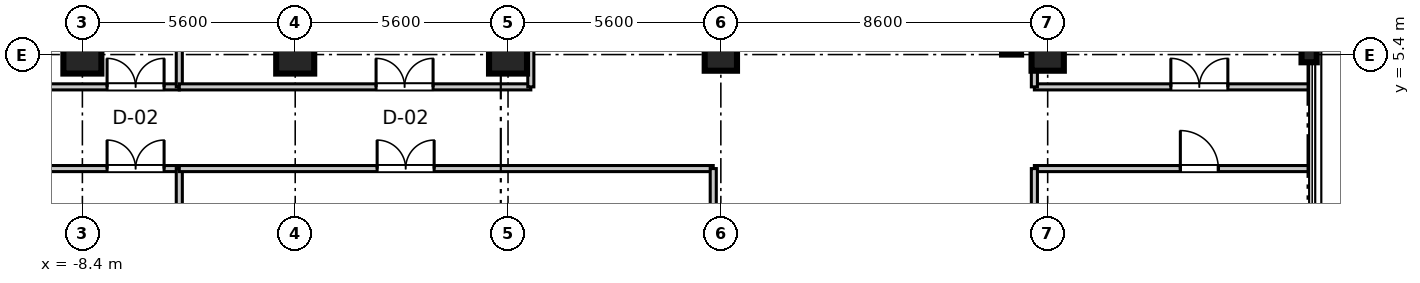
"""IFC4 building model, lengths in metres.
Left out: names, types, materials, properties, quantities, classifications, styles, units other than length and angle.
Written with IfcOpenShell. Run it as: python <this file> out.ifc"""

import sys

from ifc_helpers import new_model, si_unit, direction, frame, frame_2d, origin, origin_2d, place, context, subcontext, project, spatial, rectangle, i_section, extrude, source, transform, mapped, element, fill, save


model = new_model("IFC4")
c1 = context("Model", 3, precision=1e-05, world=origin(), true_north=direction((0.0, 1.0)))
c2 = subcontext(c1, "Body", "Model", "MODEL_VIEW")
j1 = project(units=[si_unit("LENGTHUNIT", "METRE"), si_unit("PLANEANGLEUNIT", "RADIAN")], contexts=[c1])
p1 = place(None, origin())
s1 = spatial("IfcSite", under=j1, at=p1, CompositionType="ELEMENT")
p2 = place(p1, origin())
s2 = spatial("IfcBuilding", under=s1, at=p2, CompositionType="ELEMENT")
p3 = place(p2, frame((0.0, 0.0, 256.7)))
s3 = spatial("IfcBuildingStorey", under=s2, at=p3, CompositionType="ELEMENT", Elevation=256.7)
m1 = source(origin(), c2, "Body", "SweptSolid", [
    extrude(rectangle(XDim=1.0, YDim=1.0, at=origin_2d()), origin(), (0.0, 0.0, 1.0), 4.755),
])
for number, where, z_axis, x_axis in (
    (1, (-8.4, 5.4, 0.0), (0.0, 0.0, 1.0), (1.0, 0.0, 0.0)),
    (2, (-2.8, 5.4, 0.0), (0.0, 0.0, 1.0), (1.0, 0.0, 0.0)),
    (3, (2.8, 5.4, 0.0), (0.0, 0.0, 1.0), (1.0, 0.0, 0.0)),
):
    element("IfcColumn", number, at=place(p3, frame(where, z_axis=z_axis, x_axis=x_axis)), inside=s3, PredefinedType="COLUMN", context=c2, shape_type="MappedRepresentation", body=[
        mapped(m1, transform((0.0, 0.0, 0.0), scale=1.0)),
    ])
m2 = source(origin(), c2, "Body", "SweptSolid", [
    extrude(rectangle(XDim=0.85, YDim=0.85, at=origin_2d()), origin(), (0.0, 0.0, 1.0), 4.755),
])
for number, where, z_axis, x_axis in (
    (4, (8.4, 5.4, 0.0), (0.0, 0.0, 1.0), (1.0, 0.0, 0.0)),
    (5, (17.0, 5.4, 0.0), (0.0, 0.0, 1.0), (1.0, 0.0, 0.0)),
):
    element("IfcColumn", number, at=place(p3, frame(where, z_axis=z_axis, x_axis=x_axis)), inside=s3, PredefinedType="PILASTER", context=c2, shape_type="MappedRepresentation", body=[
        mapped(m2, transform((0.0, 0.0, 0.0), scale=1.0)),
    ])
m3 = source(origin(), c2, "Body", "SweptSolid", [
    extrude(i_section(OverallWidth=0.401, OverallDepth=0.406, WebThickness=0.016, FlangeThickness=0.025, at=origin_2d()), origin(), (0.0, 0.0, 1.0), 4.707),
])
p4 = place(p3, frame((23.88, 5.4, 0.0), z_axis=(-0.148692963872, 0.0, 0.988883411983), x_axis=(0.0, -1.0, 0.0)))
e6 = element("IfcColumn", 6, at=p4, inside=s3, PredefinedType="COLUMN", context=c2, shape_type="MappedRepresentation", body=[
    mapped(m3, transform((0.0, 0.0, 0.0), scale=1.0)),
])
m4 = source(origin(), c2, "Body", "SweptSolid", [
    extrude(rectangle(XDim=11.6, YDim=0.5, at=frame_2d((5.8, 0.0))), origin(), (0.0, 0.0, 1.0), 4.44),
])
p5 = place(p3, frame((16.05, 5.4, 0.0), z_axis=(0.0, 0.0, 1.0), x_axis=(0.0, 1.0, 0.0)))
e7 = element("IfcWall", 7, at=p5, inside=s3, PredefinedType="SHEAR", context=c2, shape_type="MappedRepresentation", body=[
    mapped(m4, transform((0.0, 0.0, 0.0), scale=1.0)),
])
m5 = source(origin(), c2, "Body", "SweptSolid", [
    extrude(rectangle(XDim=18.05, YDim=0.16, at=frame_2d((9.025, 0.0))), origin(), (0.0, 0.0, 1.0), 3.4),
])
p6 = place(p3, frame((-23.9, 2.4, 0.0), z_axis=(0.0, 0.0, 1.0), x_axis=(1.0, 0.0, 0.0)))
e8 = element("IfcWall", 8, at=p6, inside=s3, PredefinedType="PARTITIONING", context=c2, shape_type="MappedRepresentation", body=[
    mapped(m5, transform((0.0, 0.0, 0.0), scale=1.0)),
])
p7 = place(p6, frame((16.15, 0.0, 0.0)))
e9 = element("IfcOpeningElement", 9, at=p7, cuts=e8, PredefinedType="OPENING", context=c2, shape_type="SweptSolid", body=[
    extrude(rectangle(XDim=1.5, YDim=2.15, at=frame_2d((0.75, 1.075))), frame((0.0, 0.09, 0.0), z_axis=(0.0, -1.0, 0.0), x_axis=(1.0, 0.0, 0.0)), (0.0, 0.0, 1.0), 0.18),
])
m6 = source(origin(), c2, "Body", "SweptSolid", [
    extrude(rectangle(XDim=4.8, YDim=0.16, at=frame_2d((2.4, 0.0))), origin(), (0.0, 0.0, 1.0), 3.4),
])
p8 = place(p3, frame((-5.85, -2.4, 0.0), z_axis=(0.0, 0.0, 1.0), x_axis=(0.0, 1.0, 0.0)))
e10 = element("IfcWall", 10, at=p8, inside=s3, PredefinedType="PARTITIONING", context=c2, shape_type="MappedRepresentation", body=[
    mapped(m6, transform((0.0, 0.0, 0.0), scale=1.0)),
])
m7 = source(origin(), c2, "Body", "SweptSolid", [
    extrude(rectangle(XDim=14.05, YDim=0.16, at=frame_2d((7.025, 0.0))), origin(), (0.0, 0.0, 1.0), 3.4),
])
p9 = place(p3, frame((-5.85, 2.4, 0.0), z_axis=(0.0, 0.0, 1.0), x_axis=(1.0, 0.0, 0.0)))
e11 = element("IfcWall", 11, at=p9, inside=s3, PredefinedType="PARTITIONING", context=c2, shape_type="MappedRepresentation", body=[
    mapped(m7, transform((0.0, 0.0, 0.0), scale=1.0)),
])
p10 = place(p9, frame((5.206, 0.0, 0.0)))
e12 = element("IfcOpeningElement", 12, at=p10, cuts=e11, PredefinedType="OPENING", context=c2, shape_type="SweptSolid", body=[
    extrude(rectangle(XDim=1.5, YDim=2.15, at=frame_2d((0.75, 1.075))), frame((0.0, 0.09, 0.0), z_axis=(0.0, -1.0, 0.0), x_axis=(1.0, 0.0, 0.0)), (0.0, 0.0, 1.0), 0.18),
])
p11 = place(p3, frame((8.2, -2.4, 0.0), z_axis=(0.0, 0.0, 1.0), x_axis=(0.0, 1.0, 0.0)))
e13 = element("IfcWall", 13, at=p11, inside=s3, PredefinedType="PARTITIONING", context=c2, shape_type="MappedRepresentation", body=[
    mapped(m6, transform((0.0, 0.0, 0.0), scale=1.0)),
])
m8 = source(origin(), c2, "Body", "SweptSolid", [
    extrude(rectangle(XDim=7.25, YDim=0.16, at=frame_2d((3.625, 0.0))), origin(), (0.0, 0.0, 1.0), 3.4),
])
p12 = place(p3, frame((16.65, 2.4, 0.0), z_axis=(0.0, 0.0, 1.0), x_axis=(1.0, 0.0, 0.0)))
e14 = element("IfcWall", 14, at=p12, inside=s3, PredefinedType="PARTITIONING", context=c2, shape_type="MappedRepresentation", body=[
    mapped(m8, transform((0.0, 0.0, 0.0), scale=1.0)),
])
p13 = place(p12, frame((3.841, 0.0, 0.0)))
e15 = element("IfcOpeningElement", 15, at=p13, cuts=e14, PredefinedType="OPENING", context=c2, shape_type="SweptSolid", body=[
    extrude(rectangle(XDim=1.0, YDim=2.1, at=frame_2d((0.5, 1.05))), frame((0.0, 0.09, 0.0), z_axis=(0.0, -1.0, 0.0), x_axis=(1.0, 0.0, 0.0)), (0.0, 0.0, 1.0), 0.18),
])
p14 = place(p3, frame((16.65, -2.4, 0.0), z_axis=(0.0, 0.0, 1.0), x_axis=(0.0, 1.0, 0.0)))
e16 = element("IfcWall", 16, at=p14, inside=s3, PredefinedType="PARTITIONING", context=c2, shape_type="MappedRepresentation", body=[
    mapped(m6, transform((0.0, 0.0, 0.0), scale=1.0)),
])
p15 = place(p3, frame((-23.9, 4.55, 0.0), z_axis=(0.0, 0.0, 1.0), x_axis=(1.0, 0.0, 0.0)))
e17 = element("IfcWall", 17, at=p15, inside=s3, PredefinedType="PARTITIONING", context=c2, shape_type="MappedRepresentation", body=[
    mapped(m5, transform((0.0, 0.0, 0.0), scale=1.0)),
])
p16 = place(p15, frame((16.15, 0.0, 0.0)))
e18 = element("IfcOpeningElement", 18, at=p16, cuts=e17, PredefinedType="OPENING", context=c2, shape_type="SweptSolid", body=[
    extrude(rectangle(XDim=1.5, YDim=2.15, at=frame_2d((0.75, 1.075))), frame((0.0, 0.09, 0.0), z_axis=(0.0, -1.0, 0.0), x_axis=(1.0, 0.0, 0.0)), (0.0, 0.0, 1.0), 0.18),
])
m9 = source(origin(), c2, "Body", "SweptSolid", [
    extrude(rectangle(XDim=19.35, YDim=0.16, at=frame_2d((9.675, 0.0))), origin(), (0.0, 0.0, 1.0), 3.4),
])
p17 = place(p3, frame((-5.85, 4.55, 0.0), z_axis=(0.0, 0.0, 1.0), x_axis=(0.0, 1.0, 0.0)))
e19 = element("IfcWall", 19, at=p17, inside=s3, PredefinedType="PARTITIONING", context=c2, shape_type="MappedRepresentation", body=[
    mapped(m9, transform((0.0, 0.0, 0.0), scale=1.0)),
])
m10 = source(origin(), c2, "Body", "SweptSolid", [
    extrude(rectangle(XDim=9.25, YDim=0.16, at=frame_2d((4.625, 0.0))), origin(), (0.0, 0.0, 1.0), 3.4),
])
p18 = place(p3, frame((-5.85, 4.55, 0.0), z_axis=(0.0, 0.0, 1.0), x_axis=(1.0, 0.0, 0.0)))
e20 = element("IfcWall", 20, at=p18, inside=s3, PredefinedType="PARTITIONING", context=c2, shape_type="MappedRepresentation", body=[
    mapped(m10, transform((0.0, 0.0, 0.0), scale=1.0)),
])
p19 = place(p18, frame((5.178, 0.0, 0.0)))
e21 = element("IfcOpeningElement", 21, at=p19, cuts=e20, PredefinedType="OPENING", context=c2, shape_type="SweptSolid", body=[
    extrude(rectangle(XDim=1.5, YDim=2.15, at=frame_2d((0.75, 1.075))), frame((0.0, 0.09, 0.0), z_axis=(0.0, -1.0, 0.0), x_axis=(1.0, 0.0, 0.0)), (0.0, 0.0, 1.0), 0.18),
])
p20 = place(p3, frame((3.4, 4.55, 0.0), z_axis=(0.0, 0.0, 1.0), x_axis=(0.0, 1.0, 0.0)))
e22 = element("IfcWall", 22, at=p20, inside=s3, PredefinedType="PARTITIONING", context=c2, shape_type="MappedRepresentation", body=[
    mapped(m9, transform((0.0, 0.0, 0.0), scale=1.0)),
])
p21 = place(p3, frame((16.65, 4.55, 0.0), z_axis=(0.0, 0.0, 1.0), x_axis=(1.0, 0.0, 0.0)))
e23 = element("IfcWall", 23, at=p21, inside=s3, PredefinedType="PARTITIONING", context=c2, shape_type="MappedRepresentation", body=[
    mapped(m8, transform((0.0, 0.0, 0.0), scale=1.0)),
])
p22 = place(p21, frame((3.591, 0.0, 0.0)))
e24 = element("IfcOpeningElement", 24, at=p22, cuts=e23, PredefinedType="OPENING", context=c2, shape_type="SweptSolid", body=[
    extrude(rectangle(XDim=1.5, YDim=2.15, at=frame_2d((0.75, 1.075))), frame((0.0, 0.09, 0.0), z_axis=(0.0, -1.0, 0.0), x_axis=(1.0, 0.0, 0.0)), (0.0, 0.0, 1.0), 0.18),
])
p23 = place(p3, frame((16.65, 4.55, 0.0), z_axis=(0.0, 0.0, 1.0), x_axis=(0.0, 1.0, 0.0)))
e25 = element("IfcWall", 25, at=p23, inside=s3, PredefinedType="PARTITIONING", context=c2, shape_type="MappedRepresentation", body=[
    mapped(m9, transform((0.0, 0.0, 0.0), scale=1.0)),
])
m11 = source(origin(), c2, "Body", "SweptSolid", [
    extrude(rectangle(XDim=1.5, YDim=2.15, at=frame_2d((0.75, 1.075))), frame((0.0, 0.025, 0.0), z_axis=(0.0, -1.0, 0.0), x_axis=(1.0, 0.0, 0.0)), (0.0, 0.0, 1.0), 0.05),
])
p24 = place(p7, frame((1.5, 0.0, 0.0), z_axis=(0.0, 0.0, 1.0), x_axis=(-1.0, 0.0, 0.0)))
e26 = element("IfcDoor", 26, at=p24, inside=s3, OperationType="DOUBLE_DOOR_SINGLE_SWING", PredefinedType="DOOR", context=c2, shape_type="MappedRepresentation", body=[
    mapped(m11, transform((0.0, 0.0, 0.0), scale=1.0)),
])
fill(e9, e26)
p25 = place(p10, frame((1.5, 0.0, 0.0), z_axis=(0.0, 0.0, 1.0), x_axis=(-1.0, 0.0, 0.0)))
e27 = element("IfcDoor", 27, at=p25, inside=s3, OperationType="DOUBLE_DOOR_SINGLE_SWING", PredefinedType="DOOR", context=c2, shape_type="MappedRepresentation", body=[
    mapped(m11, transform((0.0, 0.0, 0.0), scale=1.0)),
])
fill(e12, e27)
m12 = source(origin(), c2, "Body", "SweptSolid", [
    extrude(rectangle(XDim=1.0, YDim=2.1, at=frame_2d((0.5, 1.05))), frame((0.0, 0.025, 0.0), z_axis=(0.0, -1.0, 0.0), x_axis=(1.0, 0.0, 0.0)), (0.0, 0.0, 1.0), 0.05),
])
p26 = place(p13, frame((1.0, 0.0, 0.0), z_axis=(0.0, 0.0, 1.0), x_axis=(-1.0, 0.0, 0.0)))
e28 = element("IfcDoor", 28, at=p26, inside=s3, OperationType="SINGLE_SWING_LEFT", PredefinedType="DOOR", context=c2, shape_type="MappedRepresentation", body=[
    mapped(m12, transform((0.0, 0.0, 0.0), scale=1.0)),
])
fill(e15, e28)
p27 = place(p16, origin())
e29 = element("IfcDoor", 29, at=p27, inside=s3, OperationType="DOUBLE_DOOR_SINGLE_SWING", PredefinedType="DOOR", context=c2, shape_type="MappedRepresentation", body=[
    mapped(m11, transform((0.0, 0.0, 0.0), scale=1.0)),
])
fill(e18, e29)
p28 = place(p19, origin())
e30 = element("IfcDoor", 30, at=p28, inside=s3, OperationType="DOUBLE_DOOR_SINGLE_SWING", PredefinedType="DOOR", context=c2, shape_type="MappedRepresentation", body=[
    mapped(m11, transform((0.0, 0.0, 0.0), scale=1.0)),
])
fill(e21, e30)
p29 = place(p22, origin())
e31 = element("IfcDoor", 31, at=p29, inside=s3, OperationType="DOUBLE_DOOR_SINGLE_SWING", PredefinedType="DOOR", context=c2, shape_type="MappedRepresentation", body=[
    mapped(m11, transform((0.0, 0.0, 0.0), scale=1.0)),
])
fill(e24, e31)
save(model, sys.argv[1])
